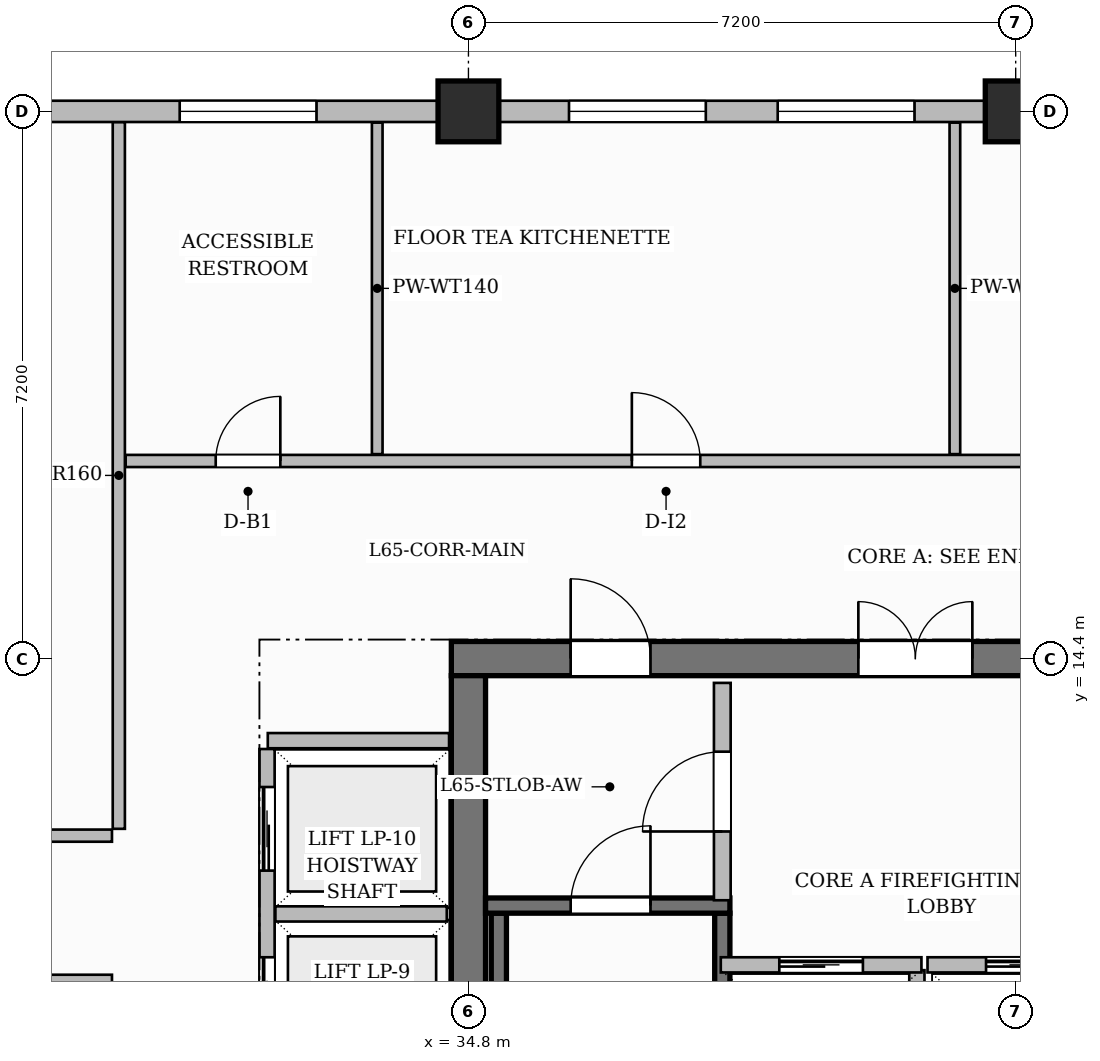
"""IFC4 building model, lengths in metres.
Left out: names, types, materials, properties, quantities, classifications, styles, units other than length and angle.
Written with IfcOpenShell. Run it as: python <this file> out.ifc"""

import sys

from ifc_helpers import new_model, si_unit, direction, frame, frame_2d, origin, origin_2d, place, context, subcontext, project, spatial, rectangle, extrude, source, transform, mapped, element, fill, save


model = new_model("IFC4")
c1 = context("Model", 3, precision=1e-05, world=origin(), true_north=direction((0.0, 1.0)))
c2 = subcontext(c1, "Body", "Model", "MODEL_VIEW")
j1 = project(units=[si_unit("LENGTHUNIT", "METRE"), si_unit("PLANEANGLEUNIT", "RADIAN")], contexts=[c1])
p1 = place(None, origin())
s1 = spatial("IfcSite", under=j1, at=p1, CompositionType="ELEMENT")
p2 = place(p1, origin())
s2 = spatial("IfcBuilding", under=s1, at=p2, CompositionType="ELEMENT")
p3 = place(p2, frame((0.0, 0.0, 259.65)))
s3 = spatial("IfcBuildingStorey", under=s2, at=p3, CompositionType="ELEMENT", Elevation=259.65)
p4 = place(p3, frame((34.575, 14.4, 0.0), z_axis=(0.0, 0.0, 1.0), x_axis=(1.0, 0.0, 0.0)))
e1 = element("IfcWall", 1, at=p4, inside=s3, PredefinedType="SHEAR", context=c2, shape_type="SweptSolid", body=[
    extrude(rectangle(XDim=15.45, YDim=0.45, at=frame_2d((7.725, 0.0))), origin(), (0.0, 0.0, 1.0), 3.85),
])
p5 = place(p4, frame((5.355, 0.0, 0.0)))
e2 = element("IfcOpeningElement", 2, at=p5, cuts=e1, PredefinedType="OPENING", context=c2, shape_type="SweptSolid", body=[
    extrude(rectangle(XDim=1.5, YDim=2.2, at=frame_2d((0.75, 1.1))), frame((0.0, 0.235, 0.0), z_axis=(0.0, -1.0, 0.0), x_axis=(1.0, 0.0, 0.0)), (0.0, 0.0, 1.0), 0.47),
])
p6 = place(p4, frame((1.57, 0.0, 0.0)))
e3 = element("IfcOpeningElement", 3, at=p6, cuts=e1, PredefinedType="OPENING", context=c2, shape_type="SweptSolid", body=[
    extrude(rectangle(XDim=1.05, YDim=2.15, at=frame_2d((0.525, 1.075))), frame((0.0, 0.235, 0.0), z_axis=(0.0, -1.0, 0.0), x_axis=(1.0, 0.0, 0.0)), (0.0, 0.0, 1.0), 0.47),
])
p7 = place(p4, frame((11.2, 0.0, 0.0)))
e4 = element("IfcOpeningElement", 4, at=p7, cuts=e1, PredefinedType="OPENING", context=c2, shape_type="SweptSolid", body=[
    extrude(rectangle(XDim=1.05, YDim=2.15, at=frame_2d((0.525, 1.075))), frame((0.0, 0.235, 0.0), z_axis=(0.0, -1.0, 0.0), x_axis=(1.0, 0.0, 0.0)), (0.0, 0.0, 1.0), 0.47),
])
p8 = place(p3, frame((34.8, 3.825, 0.0), z_axis=(0.0, 0.0, 1.0), x_axis=(0.0, 1.0, 0.0)))
e5 = element("IfcWall", 5, at=p8, inside=s3, PredefinedType="SHEAR", context=c2, shape_type="SweptSolid", body=[
    extrude(rectangle(XDim=10.35, YDim=0.45, at=frame_2d((5.175, 0.0))), origin(), (0.0, 0.0, 1.0), 3.85),
])
m1 = source(origin(), c2, "Body", "SweptSolid", [
    extrude(rectangle(XDim=0.8, YDim=0.8, at=origin_2d()), origin(), (0.0, 0.0, 1.0), 3.85),
])
for number, where, z_axis, x_axis in (
    (6, (34.8, 21.6, 0.0), (0.0, 0.0, 1.0), (1.0, 0.0, 0.0)),
    (7, (42.0, 21.6, 0.0), (0.0, 0.0, 1.0), (1.0, 0.0, 0.0)),
):
    element("IfcColumn", number, at=place(p3, frame(where, z_axis=z_axis, x_axis=x_axis)), inside=s3, PredefinedType="COLUMN", context=c2, shape_type="MappedRepresentation", body=[
        mapped(m1, transform((0.0, 0.0, 0.0), scale=1.0)),
    ])
for number, where, z_axis, x_axis in (
    (8, (35.2, 4.1, 0.0), (0.0, 0.0, 1.0), (0.0, 1.0, 0.0)),
    (9, (38.14, 4.1, 0.0), (0.0, 0.0, 1.0), (0.0, 1.0, 0.0)),
):
    element("IfcWall", number, at=place(p3, frame(where, z_axis=z_axis, x_axis=x_axis)), inside=s3, PredefinedType="SHEAR", context=c2, shape_type="SweptSolid", body=[
        extrude(rectangle(XDim=6.95, YDim=0.2, at=frame_2d((3.475, 0.0))), origin(), (0.0, 0.0, 1.0), 3.85),
    ])
p9 = place(p3, frame((35.025, 11.15, 0.0), z_axis=(0.0, 0.0, 1.0), x_axis=(1.0, 0.0, 0.0)))
e10 = element("IfcWall", 10, at=p9, inside=s3, PredefinedType="SHEAR", context=c2, shape_type="SweptSolid", body=[
    extrude(rectangle(XDim=3.215, YDim=0.2, at=frame_2d((1.607, 0.0))), origin(), (0.0, 0.0, 1.0), 3.85),
])
p10 = place(p9, frame((1.12, 0.0, 0.0)))
e11 = element("IfcOpeningElement", 11, at=p10, cuts=e10, PredefinedType="OPENING", context=c2, shape_type="SweptSolid", body=[
    extrude(rectangle(XDim=1.05, YDim=2.2, at=frame_2d((0.525, 1.1))), frame((0.0, 0.11, 0.0), z_axis=(0.0, -1.0, 0.0), x_axis=(1.0, 0.0, 0.0)), (0.0, 0.0, 1.0), 0.22),
])
p11 = place(p3, frame((40.7, 8.12, 0.0), z_axis=(0.0, 0.0, 1.0), x_axis=(0.0, 1.0, 0.0)))
e12 = element("IfcWall", 12, at=p11, inside=s3, PredefinedType="PARTITIONING", context=c2, shape_type="SweptSolid", body=[
    extrude(rectangle(XDim=2.18, YDim=0.2, at=frame_2d((1.09, 0.0))), origin(), (0.0, 0.0, 1.0), 3.6),
])
p12 = place(p3, frame((38.14, 11.22, 0.0), z_axis=(0.0, 0.0, 1.0), x_axis=(0.0, 1.0, 0.0)))
e13 = element("IfcWall", 13, at=p12, inside=s3, PredefinedType="PARTITIONING", context=c2, shape_type="SweptSolid", body=[
    extrude(rectangle(XDim=2.86, YDim=0.22, at=frame_2d((1.43, 0.0))), origin(), (0.0, 0.0, 1.0), 3.6),
])
p13 = place(p12, frame((0.905, 0.0, 0.0)))
e14 = element("IfcOpeningElement", 14, at=p13, cuts=e13, PredefinedType="OPENING", context=c2, shape_type="SweptSolid", body=[
    extrude(rectangle(XDim=1.05, YDim=2.15, at=frame_2d((0.525, 1.075))), frame((0.0, 0.12, 0.0), z_axis=(0.0, -1.0, 0.0), x_axis=(1.0, 0.0, 0.0)), (0.0, 0.0, 1.0), 0.24),
])
p14 = place(p3, frame((32.16, 13.32, 0.0), z_axis=(0.0, 0.0, 1.0), x_axis=(1.0, 0.0, 0.0)))
e15 = element("IfcWall", 15, at=p14, inside=s3, PredefinedType="PARTITIONING", context=c2, shape_type="SweptSolid", body=[
    extrude(rectangle(XDim=2.385, YDim=0.2, at=frame_2d((1.192, 0.0))), origin(), (0.0, 0.0, 1.0), 3.6),
])
p15 = place(p3, frame((32.15, 4.39, 0.0), z_axis=(0.0, 0.0, 1.0), x_axis=(0.0, 1.0, 0.0)))
e16 = element("IfcWall", 16, at=p15, inside=s3, PredefinedType="PARTITIONING", context=c2, shape_type="SweptSolid", body=[
    extrude(rectangle(XDim=8.82, YDim=0.2, at=frame_2d((4.41, 0.0))), origin(), (0.0, 0.0, 1.0), 3.6),
])
p16 = place(p15, frame((0.5, 0.0, 0.0)))
e17 = element("IfcOpeningElement", 17, at=p16, cuts=e16, PredefinedType="OPENING", context=c2, shape_type="SweptSolid", body=[
    extrude(rectangle(XDim=1.1, YDim=2.2, at=frame_2d((0.55, 1.1))), frame((0.0, 0.11, 0.0), z_axis=(0.0, -1.0, 0.0), x_axis=(1.0, 0.0, 0.0)), (0.0, 0.0, 1.0), 0.22),
])
p17 = place(p15, frame((2.74, 0.0, 0.0)))
e18 = element("IfcOpeningElement", 18, at=p17, cuts=e16, PredefinedType="OPENING", context=c2, shape_type="SweptSolid", body=[
    extrude(rectangle(XDim=1.1, YDim=2.2, at=frame_2d((0.55, 1.1))), frame((0.0, 0.11, 0.0), z_axis=(0.0, -1.0, 0.0), x_axis=(1.0, 0.0, 0.0)), (0.0, 0.0, 1.0), 0.22),
])
p18 = place(p15, frame((4.98, 0.0, 0.0)))
e19 = element("IfcOpeningElement", 19, at=p18, cuts=e16, PredefinedType="OPENING", context=c2, shape_type="SweptSolid", body=[
    extrude(rectangle(XDim=1.1, YDim=2.2, at=frame_2d((0.55, 1.1))), frame((0.0, 0.11, 0.0), z_axis=(0.0, -1.0, 0.0), x_axis=(1.0, 0.0, 0.0)), (0.0, 0.0, 1.0), 0.22),
])
p19 = place(p15, frame((7.22, 0.0, 0.0)))
e20 = element("IfcOpeningElement", 20, at=p19, cuts=e16, PredefinedType="OPENING", context=c2, shape_type="SweptSolid", body=[
    extrude(rectangle(XDim=1.1, YDim=2.2, at=frame_2d((0.55, 1.1))), frame((0.0, 0.11, 0.0), z_axis=(0.0, -1.0, 0.0), x_axis=(1.0, 0.0, 0.0)), (0.0, 0.0, 1.0), 0.22),
])
p20 = place(p3, frame((32.26, 11.04, 0.0), z_axis=(0.0, 0.0, 1.0), x_axis=(1.0, 0.0, 0.0)))
e21 = element("IfcWall", 21, at=p20, inside=s3, PredefinedType="PARTITIONING", context=c2, shape_type="SweptSolid", body=[
    extrude(rectangle(XDim=2.255, YDim=0.2, at=frame_2d((1.127, 0.0))), origin(), (0.0, 0.0, 1.0), 3.6),
])
p21 = place(p3, frame((18.148, 10.15, 0.0), z_axis=(0.0, 0.0, 1.0), x_axis=(1.0, 0.0, 0.0)))
e22 = element("IfcWall", 22, at=p21, inside=s3, PredefinedType="PARTITIONING", context=c2, shape_type="SweptSolid", body=[
    extrude(rectangle(XDim=11.962, YDim=0.18, at=frame_2d((5.981, 0.0))), origin(), (0.0, 0.0, 1.0), 3.6),
])
p22 = place(p21, frame((3.942, 0.0, 0.0)))
e23 = element("IfcOpeningElement", 23, at=p22, cuts=e22, PredefinedType="OPENING", context=c2, shape_type="SweptSolid", body=[
    extrude(rectangle(XDim=1.05, YDim=2.25, at=frame_2d((0.525, 1.125))), frame((0.0, 0.1, 0.0), z_axis=(0.0, -1.0, 0.0), x_axis=(1.0, 0.0, 0.0)), (0.0, 0.0, 1.0), 0.2),
])
p23 = place(p3, frame((18.148, 12.07, 0.0), z_axis=(0.0, 0.0, 1.0), x_axis=(1.0, 0.0, 0.0)))
e24 = element("IfcWall", 24, at=p23, inside=s3, PredefinedType="PARTITIONING", context=c2, shape_type="SweptSolid", body=[
    extrude(rectangle(XDim=11.962, YDim=0.16, at=frame_2d((5.981, 0.0))), origin(), (0.0, 0.0, 1.0), 3.6),
])
p24 = place(p23, frame((3.677, 0.0, 0.0)))
e25 = element("IfcOpeningElement", 25, at=p24, cuts=e24, PredefinedType="OPENING", context=c2, shape_type="SweptSolid", body=[
    extrude(rectangle(XDim=1.0, YDim=2.2, at=frame_2d((0.5, 1.1))), frame((0.0, 0.09, 0.0), z_axis=(0.0, -1.0, 0.0), x_axis=(1.0, 0.0, 0.0)), (0.0, 0.0, 1.0), 0.18),
])
p25 = place(p23, frame((9.677, 0.0, 0.0)))
e26 = element("IfcOpeningElement", 26, at=p25, cuts=e24, PredefinedType="OPENING", context=c2, shape_type="SweptSolid", body=[
    extrude(rectangle(XDim=1.05, YDim=2.25, at=frame_2d((0.525, 1.125))), frame((0.0, 0.09, 0.0), z_axis=(0.0, -1.0, 0.0), x_axis=(1.0, 0.0, 0.0)), (0.0, 0.0, 1.0), 0.18),
])
p26 = place(p3, frame((30.2, 12.16, 0.0), z_axis=(0.0, 0.0, 1.0), x_axis=(0.0, 1.0, 0.0)))
e27 = element("IfcWall", 27, at=p26, inside=s3, PredefinedType="PARTITIONING", context=c2, shape_type="SweptSolid", body=[
    extrude(rectangle(XDim=9.3, YDim=0.16, at=frame_2d((4.65, 0.0))), origin(), (0.0, 0.0, 1.0), 3.6),
])
p27 = place(p3, frame((30.29, 17.0, 0.0), z_axis=(0.0, 0.0, 1.0), x_axis=(1.0, 0.0, 0.0)))
e28 = element("IfcWall", 28, at=p27, inside=s3, PredefinedType="PARTITIONING", context=c2, shape_type="SweptSolid", body=[
    extrude(rectangle(XDim=19.37, YDim=0.16, at=frame_2d((9.685, 0.0))), origin(), (0.0, 0.0, 1.0), 3.6),
])
p28 = place(p27, frame((1.185, 0.0, 0.0)))
e29 = element("IfcOpeningElement", 29, at=p28, cuts=e28, PredefinedType="OPENING", context=c2, shape_type="SweptSolid", body=[
    extrude(rectangle(XDim=0.85, YDim=2.1, at=frame_2d((0.425, 1.05))), frame((0.0, 0.09, 0.0), z_axis=(0.0, -1.0, 0.0), x_axis=(1.0, 0.0, 0.0)), (0.0, 0.0, 1.0), 0.18),
])
p29 = place(p27, frame((6.66, 0.0, 0.0)))
e30 = element("IfcOpeningElement", 30, at=p29, cuts=e28, PredefinedType="OPENING", context=c2, shape_type="SweptSolid", body=[
    extrude(rectangle(XDim=0.9, YDim=2.15, at=frame_2d((0.45, 1.075))), frame((0.0, 0.09, 0.0), z_axis=(0.0, -1.0, 0.0), x_axis=(1.0, 0.0, 0.0)), (0.0, 0.0, 1.0), 0.18),
])
p30 = place(p27, frame((14.46, 0.0, 0.0)))
e31 = element("IfcOpeningElement", 31, at=p30, cuts=e28, PredefinedType="OPENING", context=c2, shape_type="SweptSolid", body=[
    extrude(rectangle(XDim=1.4, YDim=2.35, at=frame_2d((0.7, 1.175))), frame((0.0, 0.09, 0.0), z_axis=(0.0, -1.0, 0.0), x_axis=(1.0, 0.0, 0.0)), (0.0, 0.0, 1.0), 0.18),
])
for number, where, z_axis, x_axis in (
    (32, (33.6, 17.09, 0.0), (0.0, 0.0, 1.0), (0.0, 1.0, 0.0)),
    (33, (41.2, 17.09, 0.0), (0.0, 0.0, 1.0), (0.0, 1.0, 0.0)),
):
    element("IfcWall", number, at=place(p3, frame(where, z_axis=z_axis, x_axis=x_axis)), inside=s3, PredefinedType="PARTITIONING", context=c2, shape_type="SweptSolid", body=[
        extrude(rectangle(XDim=4.362, YDim=0.14, at=frame_2d((2.181, 0.0))), origin(), (0.0, 0.0, 1.0), 3.6),
    ])
p31 = place(p3, frame((38.12, 10.37, 0.0), z_axis=(0.0, 0.0, 1.0), x_axis=(1.0, 0.0, 0.0)))
e34 = element("IfcWall", 34, at=p31, inside=s3, PredefinedType="PARTITIONING", context=c2, shape_type="SweptSolid", body=[
    extrude(rectangle(XDim=2.64, YDim=0.2, at=frame_2d((1.32, 0.0))), origin(), (0.0, 0.0, 1.0), 3.6),
])
p32 = place(p31, frame((0.77, 0.0, 0.0)))
e35 = element("IfcOpeningElement", 35, at=p32, cuts=e34, PredefinedType="OPENING", context=c2, shape_type="SweptSolid", body=[
    extrude(rectangle(XDim=1.1, YDim=2.2, at=frame_2d((0.55, 1.1))), frame((0.0, 0.11, 0.0), z_axis=(0.0, -1.0, 0.0), x_axis=(1.0, 0.0, 0.0)), (0.0, 0.0, 1.0), 0.22),
])
p33 = place(p3, frame((40.84, 10.37, 0.0), z_axis=(0.0, 0.0, 1.0), x_axis=(1.0, 0.0, 0.0)))
e36 = element("IfcWall", 36, at=p33, inside=s3, PredefinedType="PARTITIONING", context=c2, shape_type="SweptSolid", body=[
    extrude(rectangle(XDim=2.64, YDim=0.2, at=frame_2d((1.32, 0.0))), origin(), (0.0, 0.0, 1.0), 3.6),
])
p34 = place(p33, frame((0.77, 0.0, 0.0)))
e37 = element("IfcOpeningElement", 37, at=p34, cuts=e36, PredefinedType="OPENING", context=c2, shape_type="SweptSolid", body=[
    extrude(rectangle(XDim=1.1, YDim=2.2, at=frame_2d((0.55, 1.1))), frame((0.0, 0.11, 0.0), z_axis=(0.0, -1.0, 0.0), x_axis=(1.0, 0.0, 0.0)), (0.0, 0.0, 1.0), 0.22),
])
p35 = place(p3, frame((18.0, 21.6, 0.0), z_axis=(0.0, 0.0, 1.0), x_axis=(1.0, 0.0, 0.0)))
e38 = element("IfcWall", 38, at=p35, inside=s3, PredefinedType="SOLIDWALL", context=c2, shape_type="SweptSolid", body=[
    extrude(rectangle(XDim=31.8, YDim=0.28, at=frame_2d((15.9, 0.0))), origin(), (0.0, 0.0, 1.0), 3.185),
])
p36 = place(p35, frame((0.42, 0.0, 0.0)))
e39 = element("IfcOpeningElement", 39, at=p36, cuts=e38, PredefinedType="OPENING", context=c2, shape_type="SweptSolid", body=[
    extrude(rectangle(XDim=1.2, YDim=2.2, at=frame_2d((0.6, 1.1))), frame((0.0, 0.15, 0.0), z_axis=(0.0, -1.0, 0.0), x_axis=(1.0, 0.0, 0.0)), (0.0, 0.0, 1.0), 0.3),
])
p37 = place(p35, frame((4.721, 0.0, 0.8)))
e40 = element("IfcOpeningElement", 40, at=p37, cuts=e38, PredefinedType="OPENING", context=c2, shape_type="SweptSolid", body=[
    extrude(rectangle(XDim=1.15, YDim=1.8, at=frame_2d((0.575, 0.9))), frame((0.0, 0.15, 0.0), z_axis=(0.0, -1.0, 0.0), x_axis=(1.0, 0.0, 0.0)), (0.0, 0.0, 1.0), 0.3),
])
p38 = place(p35, frame((7.204, 0.0, 0.8)))
e41 = element("IfcOpeningElement", 41, at=p38, cuts=e38, PredefinedType="OPENING", context=c2, shape_type="SweptSolid", body=[
    extrude(rectangle(XDim=1.8, YDim=1.85, at=frame_2d((0.9, 0.925))), frame((0.0, 0.15, 0.0), z_axis=(0.0, -1.0, 0.0), x_axis=(1.0, 0.0, 0.0)), (0.0, 0.0, 1.0), 0.3),
])
p39 = place(p35, frame((13.001, 0.0, 0.8)))
e42 = element("IfcOpeningElement", 42, at=p39, cuts=e38, PredefinedType="OPENING", context=c2, shape_type="SweptSolid", body=[
    extrude(rectangle(XDim=1.8, YDim=1.85, at=frame_2d((0.9, 0.925))), frame((0.0, 0.15, 0.0), z_axis=(0.0, -1.0, 0.0), x_axis=(1.0, 0.0, 0.0)), (0.0, 0.0, 1.0), 0.3),
])
p40 = place(p35, frame((18.123, 0.0, 0.8)))
e43 = element("IfcOpeningElement", 43, at=p40, cuts=e38, PredefinedType="OPENING", context=c2, shape_type="SweptSolid", body=[
    extrude(rectangle(XDim=1.8, YDim=1.85, at=frame_2d((0.9, 0.925))), frame((0.0, 0.15, 0.0), z_axis=(0.0, -1.0, 0.0), x_axis=(1.0, 0.0, 0.0)), (0.0, 0.0, 1.0), 0.3),
])
p41 = place(p35, frame((20.869, 0.0, 0.8)))
e44 = element("IfcOpeningElement", 44, at=p41, cuts=e38, PredefinedType="OPENING", context=c2, shape_type="SweptSolid", body=[
    extrude(rectangle(XDim=1.8, YDim=1.85, at=frame_2d((0.9, 0.925))), frame((0.0, 0.15, 0.0), z_axis=(0.0, -1.0, 0.0), x_axis=(1.0, 0.0, 0.0)), (0.0, 0.0, 1.0), 0.3),
])
p42 = place(p35, frame((25.475, 0.0, 0.8)))
e45 = element("IfcOpeningElement", 45, at=p42, cuts=e38, PredefinedType="OPENING", context=c2, shape_type="SweptSolid", body=[
    extrude(rectangle(XDim=1.8, YDim=1.85, at=frame_2d((0.9, 0.925))), frame((0.0, 0.15, 0.0), z_axis=(0.0, -1.0, 0.0), x_axis=(1.0, 0.0, 0.0)), (0.0, 0.0, 1.0), 0.3),
])
p43 = place(p35, frame((28.525, 0.0, 0.8)))
e46 = element("IfcOpeningElement", 46, at=p43, cuts=e38, PredefinedType="OPENING", context=c2, shape_type="SweptSolid", body=[
    extrude(rectangle(XDim=1.8, YDim=1.85, at=frame_2d((0.9, 0.925))), frame((0.0, 0.15, 0.0), z_axis=(0.0, -1.0, 0.0), x_axis=(1.0, 0.0, 0.0)), (0.0, 0.0, 1.0), 0.3),
])
m2 = source(origin(), c2, "Body", "SweptSolid", [
    extrude(rectangle(XDim=1.05, YDim=2.2, at=frame_2d((0.525, 1.1))), frame((0.0, 0.025, 0.0), z_axis=(0.0, -1.0, 0.0), x_axis=(1.0, 0.0, 0.0)), (0.0, 0.0, 1.0), 0.05),
])
p44 = place(p10, origin())
e47 = element("IfcDoor", 47, at=p44, inside=s3, OperationType="SINGLE_SWING_RIGHT", PredefinedType="DOOR", context=c2, shape_type="MappedRepresentation", body=[
    mapped(m2, transform((0.0, 0.0, 0.0), scale=1.0)),
])
fill(e11, e47)
m3 = source(origin(), c2, "Body", "SweptSolid", [
    extrude(rectangle(XDim=1.05, YDim=2.15, at=frame_2d((0.525, 1.075))), frame((0.0, 0.025, 0.0), z_axis=(0.0, -1.0, 0.0), x_axis=(1.0, 0.0, 0.0)), (0.0, 0.0, 1.0), 0.05),
])
p45 = place(p13, origin())
e48 = element("IfcDoor", 48, at=p45, inside=s3, OperationType="SINGLE_SWING_LEFT", PredefinedType="DOOR", context=c2, shape_type="MappedRepresentation", body=[
    mapped(m3, transform((0.0, 0.0, 0.0), scale=1.0)),
])
fill(e14, e48)
m4 = source(origin(), c2, "Body", "SweptSolid", [
    extrude(rectangle(XDim=1.5, YDim=2.2, at=frame_2d((0.75, 1.1))), frame((0.0, 0.025, 0.0), z_axis=(0.0, -1.0, 0.0), x_axis=(1.0, 0.0, 0.0)), (0.0, 0.0, 1.0), 0.05),
])
p46 = place(p5, origin())
e49 = element("IfcDoor", 49, at=p46, inside=s3, OperationType="DOUBLE_DOOR_SINGLE_SWING", PredefinedType="DOOR", context=c2, shape_type="MappedRepresentation", body=[
    mapped(m4, transform((0.0, 0.0, 0.0), scale=1.0)),
])
fill(e2, e49)
p47 = place(p6, origin())
e50 = element("IfcDoor", 50, at=p47, inside=s3, OperationType="SINGLE_SWING_LEFT", PredefinedType="DOOR", context=c2, shape_type="MappedRepresentation", body=[
    mapped(m3, transform((0.0, 0.0, 0.0), scale=1.0)),
])
fill(e3, e50)
m5 = source(origin(), c2, "Body", "SweptSolid", [
    extrude(rectangle(XDim=0.85, YDim=2.1, at=frame_2d((0.425, 1.05))), frame((0.0, 0.025, 0.0), z_axis=(0.0, -1.0, 0.0), x_axis=(1.0, 0.0, 0.0)), (0.0, 0.0, 1.0), 0.05),
])
p48 = place(p28, origin())
e51 = element("IfcDoor", 51, at=p48, inside=s3, OperationType="SINGLE_SWING_RIGHT", PredefinedType="DOOR", context=c2, shape_type="MappedRepresentation", body=[
    mapped(m5, transform((0.0, 0.0, 0.0), scale=1.0)),
])
fill(e29, e51)
m6 = source(origin(), c2, "Body", "SweptSolid", [
    extrude(rectangle(XDim=0.9, YDim=2.15, at=frame_2d((0.45, 1.075))), frame((0.0, 0.025, 0.0), z_axis=(0.0, -1.0, 0.0), x_axis=(1.0, 0.0, 0.0)), (0.0, 0.0, 1.0), 0.05),
])
p49 = place(p29, origin())
e52 = element("IfcDoor", 52, at=p49, inside=s3, OperationType="SINGLE_SWING_LEFT", PredefinedType="DOOR", context=c2, shape_type="MappedRepresentation", body=[
    mapped(m6, transform((0.0, 0.0, 0.0), scale=1.0)),
])
fill(e30, e52)
m7 = source(origin(), c2, "Body", "SweptSolid", [
    extrude(rectangle(XDim=1.1, YDim=2.2, at=frame_2d((0.55, 1.1))), frame((0.0, 0.025, 0.0), z_axis=(0.0, -1.0, 0.0), x_axis=(1.0, 0.0, 0.0)), (0.0, 0.0, 1.0), 0.05),
])
p50 = place(p32, origin())
e53 = element("IfcDoor", 53, at=p50, inside=s3, OperationType="SLIDING_TO_LEFT", PredefinedType="DOOR", context=c2, shape_type="MappedRepresentation", body=[
    mapped(m7, transform((0.0, 0.0, 0.0), scale=1.0)),
])
fill(e35, e53)
p51 = place(p34, origin())
e54 = element("IfcDoor", 54, at=p51, inside=s3, OperationType="SLIDING_TO_LEFT", PredefinedType="DOOR", context=c2, shape_type="MappedRepresentation", body=[
    mapped(m7, transform((0.0, 0.0, 0.0), scale=1.0)),
])
fill(e37, e54)
p52 = place(p18, origin())
e55 = element("IfcDoor", 55, at=p52, inside=s3, OperationType="SLIDING_TO_LEFT", PredefinedType="DOOR", context=c2, shape_type="MappedRepresentation", body=[
    mapped(m7, transform((0.0, 0.0, 0.0), scale=1.0)),
])
fill(e19, e55)
p53 = place(p19, origin())
e56 = element("IfcDoor", 56, at=p53, inside=s3, OperationType="SLIDING_TO_LEFT", PredefinedType="DOOR", context=c2, shape_type="MappedRepresentation", body=[
    mapped(m7, transform((0.0, 0.0, 0.0), scale=1.0)),
])
fill(e20, e56)
m8 = source(origin(), c2, "Body", "SweptSolid", [
    extrude(rectangle(XDim=1.8, YDim=1.85, at=frame_2d((0.9, 0.925))), frame((0.0, 0.03, 0.0), z_axis=(0.0, -1.0, 0.0), x_axis=(1.0, 0.0, 0.0)), (0.0, 0.0, 1.0), 0.06),
])
p54 = place(p39, origin())
e57 = element("IfcWindow", 57, at=p54, inside=s3, PartitioningType="DOUBLE_PANEL_VERTICAL", PredefinedType="WINDOW", context=c2, shape_type="MappedRepresentation", body=[
    mapped(m8, transform((0.0, 0.0, 0.0), scale=1.0)),
])
fill(e42, e57)
p55 = place(p40, origin())
e58 = element("IfcWindow", 58, at=p55, inside=s3, PartitioningType="DOUBLE_PANEL_VERTICAL", PredefinedType="WINDOW", context=c2, shape_type="MappedRepresentation", body=[
    mapped(m8, transform((0.0, 0.0, 0.0), scale=1.0)),
])
fill(e43, e58)
p56 = place(p41, origin())
e59 = element("IfcWindow", 59, at=p56, inside=s3, PartitioningType="DOUBLE_PANEL_VERTICAL", PredefinedType="WINDOW", context=c2, shape_type="MappedRepresentation", body=[
    mapped(m8, transform((0.0, 0.0, 0.0), scale=1.0)),
])
fill(e44, e59)
save(model, sys.argv[1])
